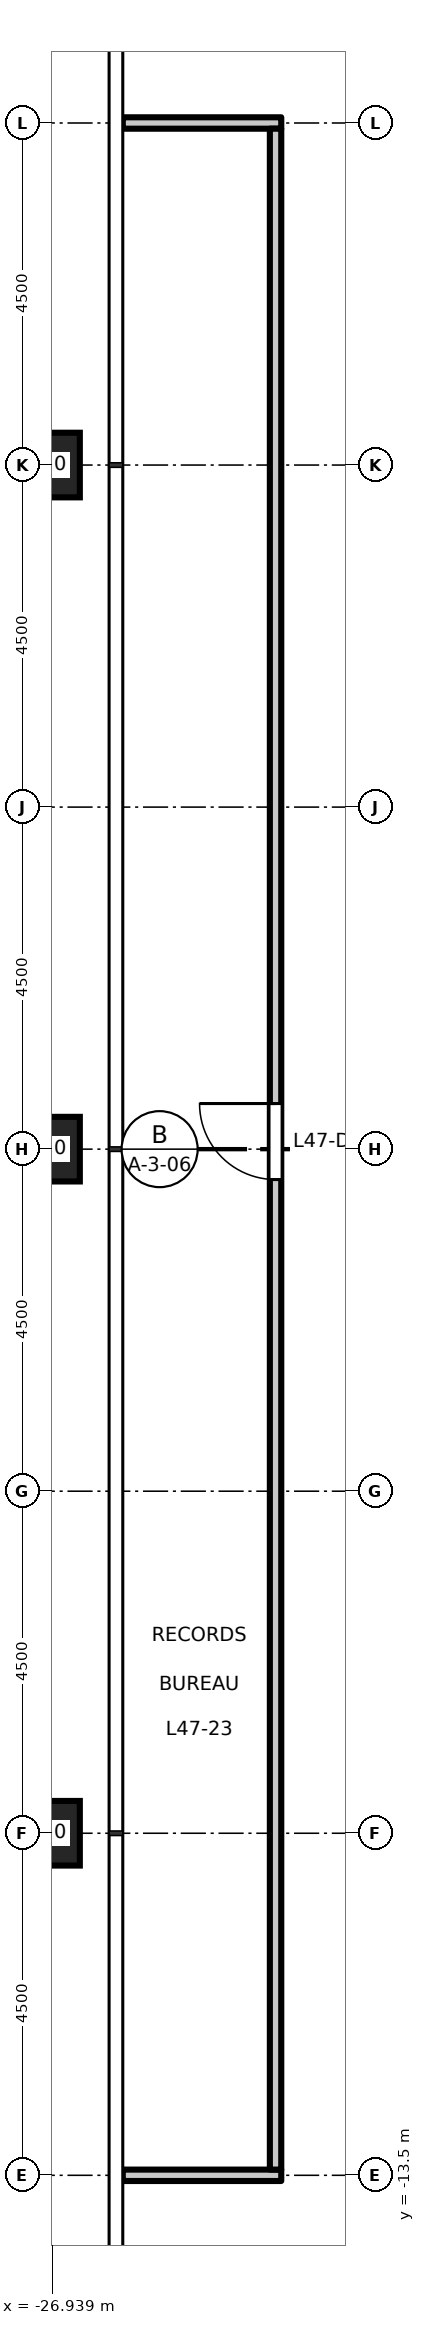
"""IFC4 building model, lengths in metres.
Left out: names, types, materials, properties, quantities, classifications, styles, units other than length and angle.
Written with IfcOpenShell. Run it as: python <this file> out.ifc"""

import sys

from ifc_helpers import new_model, si_unit, direction, frame, frame_2d, origin, origin_2d, place, context, subcontext, project, spatial, rectangle, hollow_rectangle, extrude, element, fill, save


model = new_model("IFC4")
c1 = context("Model", 3, precision=1e-05, world=origin(), true_north=direction((0.0, 1.0)))
c2 = subcontext(c1, "Body", "Model", "MODEL_VIEW")
j1 = project(units=[si_unit("LENGTHUNIT", "METRE"), si_unit("PLANEANGLEUNIT", "RADIAN")], contexts=[c1])
p1 = place(None, origin())
s1 = spatial("IfcSite", under=j1, at=p1, CompositionType="ELEMENT")
p2 = place(p1, origin())
s2 = spatial("IfcBuilding", under=s1, at=p2, CompositionType="ELEMENT")
p3 = place(p2, frame((0.0, 0.0, 219.7)))
s3 = spatial("IfcBuildingStorey", under=s2, at=p3, CompositionType="ELEMENT", Elevation=219.7)
for number, where, z_axis, x_axis in (
    (1, (-27.0, 9.0, 0.0), (0.0, 0.0, 1.0), (1.0, 0.0, 0.0)),
    (2, (-27.0, 0.0, 0.0), (0.0, 0.0, 1.0), (1.0, 0.0, 0.0)),
    (3, (-27.0, -9.0, 0.0), (0.0, 0.0, 1.0), (1.0, 0.0, 0.0)),
):
    element("IfcColumn", number, at=place(p3, frame(where, z_axis=z_axis, x_axis=x_axis)), inside=s3, PredefinedType="COLUMN", context=c2, shape_type="SweptSolid", body=[
        extrude(hollow_rectangle(XDim=0.85, YDim=0.85, WallThickness=0.05, at=origin_2d()), origin(), (0.0, 0.0, 1.0), 4.5),
    ])
p4 = place(p3, frame((-26.01, -13.5, 0.0), z_axis=(0.0, 0.0, 1.0), x_axis=(1.0, 0.0, 0.0)))
e4 = element("IfcWall", 4, at=p4, inside=s3, PredefinedType="PARTITIONING", context=c2, shape_type="SweptSolid", body=[
    extrude(rectangle(XDim=2.085, YDim=0.15, at=frame_2d((1.042, 0.0))), origin(), (0.0, 0.0, 1.0), 3.95),
])
p5 = place(p3, frame((-26.01, 13.5, 0.0), z_axis=(0.0, 0.0, 1.0), x_axis=(1.0, 0.0, 0.0)))
e5 = element("IfcWall", 5, at=p5, inside=s3, PredefinedType="PARTITIONING", context=c2, shape_type="SweptSolid", body=[
    extrude(rectangle(XDim=2.085, YDim=0.15, at=frame_2d((1.042, 0.0))), origin(), (0.0, 0.0, 1.0), 4.35),
])
p6 = place(p3, frame((-24.0, -13.425, 0.0), z_axis=(0.0, 0.0, 1.0), x_axis=(0.0, 1.0, 0.0)))
e6 = element("IfcWall", 6, at=p6, inside=s3, PredefinedType="PARTITIONING", context=c2, shape_type="SweptSolid", body=[
    extrude(rectangle(XDim=26.85, YDim=0.15, at=frame_2d((13.425, 0.0))), origin(), (0.0, 0.0, 1.0), 4.35),
])
p7 = place(p6, frame((13.025, 0.0, 0.0)))
e7 = element("IfcOpeningElement", 7, at=p7, cuts=e6, PredefinedType="OPENING", context=c2, shape_type="SweptSolid", body=[
    extrude(rectangle(XDim=1.0, YDim=2.1, at=frame_2d((0.5, 1.05))), frame((0.0, 0.085, 0.0), z_axis=(0.0, -1.0, 0.0), x_axis=(1.0, 0.0, 0.0)), (0.0, 0.0, 1.0), 0.17),
])
p8 = place(p7, origin())
e8 = element("IfcDoor", 8, at=p8, inside=s3, OperationType="SINGLE_SWING_RIGHT", PredefinedType="DOOR", context=c2, shape_type="SweptSolid", body=[
    extrude(rectangle(XDim=1.0, YDim=2.1, at=frame_2d((0.5, 1.05))), frame((0.0, 0.025, 0.0), z_axis=(0.0, -1.0, 0.0), x_axis=(1.0, 0.0, 0.0)), (0.0, 0.0, 1.0), 0.05),
])
fill(e7, e8)
save(model, sys.argv[1])
